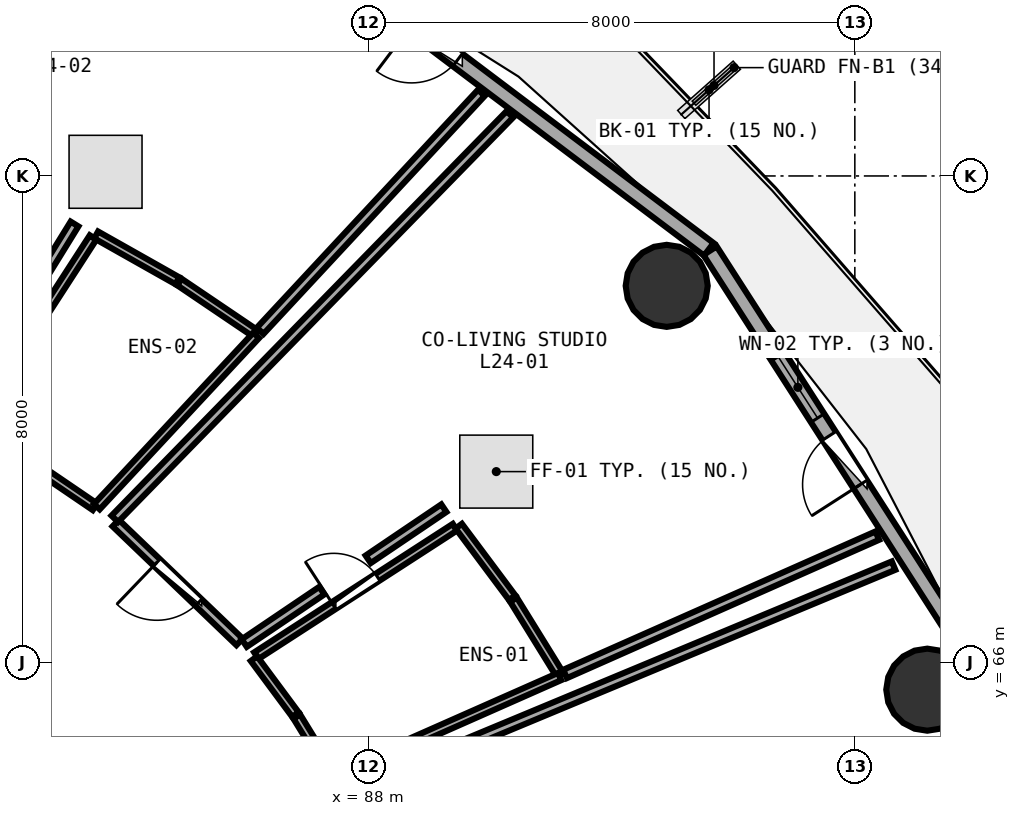
"""IFC4 building model, lengths in metres.
Left out: names, types, materials, properties, quantities, classifications, styles, units other than length and angle.
Written with IfcOpenShell. Run it as: python <this file> out.ifc"""

import sys

from ifc_helpers import new_model, si_unit, direction, frame, frame_2d, origin, origin_2d, place, context, subcontext, project, spatial, rectangle, circle, extrude, element, fill, save


model = new_model("IFC4")
c1 = context("Model", 3, precision=1e-05, world=origin(), true_north=direction((0.0, 1.0)))
c2 = subcontext(c1, "Body", "Model", "MODEL_VIEW")
j1 = project(units=[si_unit("LENGTHUNIT", "METRE"), si_unit("PLANEANGLEUNIT", "RADIAN")], contexts=[c1])
p1 = place(None, origin())
s1 = spatial("IfcSite", under=j1, at=p1, CompositionType="ELEMENT")
p2 = place(p1, origin())
s2 = spatial("IfcBuilding", under=s1, at=p2, CompositionType="ELEMENT")
p3 = place(p2, frame((0.0, 0.0, 95.1)))
s3 = spatial("IfcBuildingStorey", under=s2, at=p3, CompositionType="ELEMENT", Elevation=95.1)
for number, where, z_axis, x_axis in (
    (1, (97.192, 65.552, 0.0), (0.0, 0.0, 1.0), (1.0, 0.0, 0.0)),
    (2, (92.906, 72.193, 0.0), (0.0, 0.0, 1.0), (1.0, 0.0, 0.0)),
):
    element("IfcColumn", number, at=place(p3, frame(where, z_axis=z_axis, x_axis=x_axis)), inside=s3, PredefinedType="COLUMN", context=c2, shape_type="SweptSolid", body=[
        extrude(circle(Radius=0.675, at=origin_2d()), origin(), (0.0, 0.0, 1.0), 3.75),
    ])
p4 = place(p3, frame((98.048, 65.879, 0.0), z_axis=(0.0, 0.0, 1.0), x_axis=(-0.540620528459, 0.841266571432, 0.0)))
e3 = element("IfcWall", 3, at=p4, inside=s3, PredefinedType="SOLIDWALL", context=c2, shape_type="SweptSolid", body=[
    extrude(rectangle(XDim=8.193, YDim=0.26, at=frame_2d((4.096, 0.0))), origin(), (0.0, 0.0, 1.0), 3.475),
])
p5 = place(p4, frame((3.621, 0.0, 0.0)))
e4 = element("IfcOpeningElement", 4, at=p5, cuts=e3, PredefinedType="OPENING", context=c2, shape_type="SweptSolid", body=[
    extrude(rectangle(XDim=0.95, YDim=2.1, at=frame_2d((0.475, 1.05))), frame((0.0, 0.14, 0.0), z_axis=(0.0, -1.0, 0.0), x_axis=(1.0, 0.0, 0.0)), (0.0, 0.0, 1.0), 0.28),
])
p6 = place(p4, frame((4.921, 0.0, 0.85)))
e5 = element("IfcOpeningElement", 5, at=p6, cuts=e3, PredefinedType="OPENING", context=c2, shape_type="SweptSolid", body=[
    extrude(rectangle(XDim=1.2, YDim=1.45, at=frame_2d((0.6, 0.725))), frame((0.0, 0.14, 0.0), z_axis=(0.0, -1.0, 0.0), x_axis=(1.0, 0.0, 0.0)), (0.0, 0.0, 1.0), 0.28),
])
p7 = place(p3, frame((93.599, 72.793, 0.0), z_axis=(0.0, 0.0, 1.0), x_axis=(-0.798501507879, 0.601992808857, 0.0)))
e6 = element("IfcWall", 6, at=p7, inside=s3, PredefinedType="SOLIDWALL", context=c2, shape_type="SweptSolid", body=[
    extrude(rectangle(XDim=8.499, YDim=0.26, at=frame_2d((4.25, 0.0))), origin(), (0.0, 0.0, 1.0), 3.475),
])
p8 = place(p7, frame((5.175, 0.0, 0.0)))
e7 = element("IfcOpeningElement", 7, at=p8, cuts=e6, PredefinedType="OPENING", context=c2, shape_type="SweptSolid", body=[
    extrude(rectangle(XDim=0.95, YDim=2.1, at=frame_2d((0.475, 1.05))), frame((0.0, 0.14, 0.0), z_axis=(0.0, -1.0, 0.0), x_axis=(1.0, 0.0, 0.0)), (0.0, 0.0, 1.0), 0.28),
])
p9 = place(p7, frame((6.475, 0.0, 0.85)))
e8 = element("IfcOpeningElement", 8, at=p9, cuts=e6, PredefinedType="OPENING", context=c2, shape_type="SweptSolid", body=[
    extrude(rectangle(XDim=1.2, YDim=1.45, at=frame_2d((0.6, 0.725))), frame((0.0, 0.14, 0.0), z_axis=(0.0, -1.0, 0.0), x_axis=(1.0, 0.0, 0.0)), (0.0, 0.0, 1.0), 0.28),
])
p10 = place(p3, frame((86.156, 66.111, 0.0), z_axis=(0.0, 0.0, 1.0), x_axis=(0.839597088747, 0.543209654339, 0.0)))
e9 = element("IfcWall", 9, at=p10, inside=s3, PredefinedType="PLUMBINGWALL", context=c2, shape_type="SweptSolid", body=[
    extrude(rectangle(XDim=3.891, YDim=0.13, at=frame_2d((1.946, 0.0))), origin(), (0.0, 0.0, 1.0), 3.175),
])
p11 = place(p10, frame((1.516, 0.0, 0.0)))
e10 = element("IfcOpeningElement", 10, at=p11, cuts=e9, PredefinedType="OPENING", context=c2, shape_type="SweptSolid", body=[
    extrude(rectangle(XDim=0.86, YDim=2.05, at=frame_2d((0.43, 1.025))), frame((0.0, 0.075, 0.0), z_axis=(0.0, -1.0, 0.0), x_axis=(1.0, 0.0, 0.0)), (0.0, 0.0, 1.0), 0.15),
])
p12 = place(p3, frame((85.882, 66.337, 0.0), z_axis=(0.0, 0.0, 1.0), x_axis=(-0.721698326825, 0.692207718144, 0.0)))
e11 = element("IfcWall", 11, at=p12, inside=s3, PredefinedType="PARTITIONING", context=c2, shape_type="SweptSolid", body=[
    extrude(rectangle(XDim=2.823, YDim=0.15, at=frame_2d((1.412, 0.0))), origin(), (0.0, 0.0, 1.0), 2.925),
])
p13 = place(p12, frame((0.936, 0.0, 0.0)))
e12 = element("IfcOpeningElement", 12, at=p13, cuts=e11, PredefinedType="OPENING", context=c2, shape_type="SweptSolid", body=[
    extrude(rectangle(XDim=0.95, YDim=2.08, at=frame_2d((0.475, 1.04))), frame((0.0, 0.085, 0.0), z_axis=(0.0, -1.0, 0.0), x_axis=(1.0, 0.0, 0.0)), (0.0, 0.0, 1.0), 0.17),
])
p14 = place(p3, frame((81.469, 69.896, 0.0), z_axis=(0.0, 0.0, 1.0), x_axis=(0.543429789712, 0.839454622748, 0.0)))
e13 = element("IfcWall", 13, at=p14, inside=s3, PredefinedType="PLUMBINGWALL", context=c2, shape_type="SweptSolid", body=[
    extrude(rectangle(XDim=3.686, YDim=0.13, at=frame_2d((1.843, 0.0))), origin(), (0.0, 0.0, 1.0), 3.175),
])
p15 = place(p14, frame((1.413, 0.0, 0.0)))
e14 = element("IfcOpeningElement", 14, at=p15, cuts=e13, PredefinedType="OPENING", context=c2, shape_type="SweptSolid", body=[
    extrude(rectangle(XDim=0.86, YDim=2.05, at=frame_2d((0.43, 1.025))), frame((0.0, 0.075, 0.0), z_axis=(0.0, -1.0, 0.0), x_axis=(1.0, 0.0, 0.0)), (0.0, 0.0, 1.0), 0.15),
])
p16 = place(p3, frame((87.417, 64.141, 0.0), z_axis=(0.0, 0.0, 1.0), x_axis=(-0.52310141153, 0.852270446077, 0.0)))
e15 = element("IfcWall", 15, at=p16, inside=s3, PredefinedType="PLUMBINGWALL", context=c2, shape_type="SweptSolid", body=[
    extrude(rectangle(XDim=1.135, YDim=0.13, at=frame_2d((0.568, 0.0))), origin(), (0.0, 0.0, 1.0), 2.925),
])
p17 = place(p3, frame((86.8, 65.142, 0.0), z_axis=(0.0, 0.0, 1.0), x_axis=(-0.595625136946, 0.803262532574, 0.0)))
e16 = element("IfcWall", 16, at=p17, inside=s3, PredefinedType="PLUMBINGWALL", context=c2, shape_type="SweptSolid", body=[
    extrude(rectangle(XDim=1.145, YDim=0.13, at=frame_2d((0.573, 0.0))), origin(), (0.0, 0.0, 1.0), 2.925),
])
p18 = place(p3, frame((89.486, 68.241, 0.0), z_axis=(0.0, 0.0, 1.0), x_axis=(0.598215175904, -0.801335512328, 0.0)))
e17 = element("IfcWall", 17, at=p18, inside=s3, PredefinedType="PLUMBINGWALL", context=c2, shape_type="SweptSolid", body=[
    extrude(rectangle(XDim=1.468, YDim=0.13, at=frame_2d((0.734, 0.0))), origin(), (0.0, 0.0, 1.0), 3.48),
])
p19 = place(p3, frame((90.386, 67.032, 0.0), z_axis=(0.0, 0.0, 1.0), x_axis=(0.525910281035, -0.850540049793, 0.0)))
e18 = element("IfcWall", 18, at=p19, inside=s3, PredefinedType="PLUMBINGWALL", context=c2, shape_type="SweptSolid", body=[
    extrude(rectangle(XDim=1.457, YDim=0.13, at=frame_2d((0.729, 0.0))), origin(), (0.0, 0.0, 1.0), 3.48),
])
p20 = place(p3, frame((91.145, 65.768, 0.0), z_axis=(0.0, 0.0, 1.0), x_axis=(-0.914586427441, -0.404390487946, 0.0)))
e19 = element("IfcWall", 19, at=p20, inside=s3, PredefinedType="PLUMBINGWALL", context=c2, shape_type="SweptSolid", body=[
    extrude(rectangle(XDim=4.045, YDim=0.13, at=frame_2d((2.022, 0.0))), origin(), (0.0, 0.0, 1.0), 2.925),
])
p21 = place(p3, frame((83.829, 68.362, 0.0), z_axis=(0.0, 0.0, 1.0), x_axis=(0.698749209364, 0.715366718833, 0.0)))
e20 = element("IfcWall", 20, at=p21, inside=s3, PredefinedType="PARTITIONING", context=c2, shape_type="SweptSolid", body=[
    extrude(rectangle(XDim=9.3, YDim=0.15, at=frame_2d((4.65, 0.0))), origin(), (0.0, 0.0, 1.0), 2.975),
])
p22 = place(p3, frame((96.369, 68.085, 0.0), z_axis=(0.0, 0.0, 1.0), x_axis=(-0.914319955381, -0.404992616219, 0.0)))
e21 = element("IfcWall", 21, at=p22, inside=s3, PredefinedType="PARTITIONING", context=c2, shape_type="SweptSolid", body=[
    extrude(rectangle(XDim=5.616, YDim=0.15, at=frame_2d((2.808, 0.0))), origin(), (0.0, 0.0, 1.0), 2.975),
])
p23 = place(p3, frame((89.241, 68.537, 0.0), z_axis=(0.0, 0.0, 1.0), x_axis=(-0.828582854192, -0.559866460631, 0.0)))
e22 = element("IfcWall", 22, at=p23, inside=s3, PredefinedType="PARTITIONING", context=c2, shape_type="SweptSolid", body=[
    extrude(rectangle(XDim=1.502, YDim=0.15, at=frame_2d((0.751, 0.0))), origin(), (0.0, 0.0, 1.0), 3.175),
])
p24 = place(p3, frame((87.234, 67.181, 0.0), z_axis=(0.0, 0.0, 1.0), x_axis=(-0.828521381114, -0.559957427879, 0.0)))
e23 = element("IfcWall", 23, at=p24, inside=s3, PredefinedType="PARTITIONING", context=c2, shape_type="SweptSolid", body=[
    extrude(rectangle(XDim=1.54, YDim=0.15, at=frame_2d((0.77, 0.0))), origin(), (0.0, 0.0, 1.0), 3.235),
])
p25 = place(p3, frame((83.503, 68.558, 0.0), z_axis=(0.0, 0.0, 1.0), x_axis=(-0.826715543633, 0.56262012932, 0.0)))
e24 = element("IfcWall", 24, at=p25, inside=s3, PredefinedType="PLUMBINGWALL", context=c2, shape_type="SweptSolid", body=[
    extrude(rectangle(XDim=1.184, YDim=0.13, at=frame_2d((0.592, 0.0))), origin(), (0.0, 0.0, 1.0), 2.925),
])
p26 = place(p3, frame((83.522, 73.03, 0.0), z_axis=(0.0, 0.0, 1.0), x_axis=(0.870915556508, -0.491432694713, 0.0)))
e25 = element("IfcWall", 25, at=p26, inside=s3, PredefinedType="PLUMBINGWALL", context=c2, shape_type="SweptSolid", body=[
    extrude(rectangle(XDim=1.533, YDim=0.13, at=frame_2d((0.767, 0.0))), origin(), (0.0, 0.0, 1.0), 2.925),
])
p27 = place(p3, frame((84.892, 72.256, 0.0), z_axis=(0.0, 0.0, 1.0), x_axis=(0.828476223524, -0.560024237917, 0.0)))
e26 = element("IfcWall", 26, at=p27, inside=s3, PredefinedType="PLUMBINGWALL", context=c2, shape_type="SweptSolid", body=[
    extrude(rectangle(XDim=1.521, YDim=0.13, at=frame_2d((0.76, 0.0))), origin(), (0.0, 0.0, 1.0), 3.175),
])
p28 = place(p3, frame((86.154, 71.378, 0.0), z_axis=(0.0, 0.0, 1.0), x_axis=(-0.681137169266, -0.732155828116, 0.0)))
e27 = element("IfcWall", 27, at=p28, inside=s3, PredefinedType="PLUMBINGWALL", context=c2, shape_type="SweptSolid", body=[
    extrude(rectangle(XDim=3.847, YDim=0.13, at=frame_2d((1.924, 0.0))), origin(), (0.0, 0.0, 1.0), 3.175),
])
p29 = place(p3, frame((89.858, 75.367, 0.0), z_axis=(0.0, 0.0, 1.0), x_axis=(-0.680841843483, -0.732430463704, 0.0)))
e28 = element("IfcWall", 28, at=p29, inside=s3, PredefinedType="PARTITIONING", context=c2, shape_type="SweptSolid", body=[
    extrude(rectangle(XDim=5.343, YDim=0.15, at=frame_2d((2.671, 0.0))), origin(), (0.0, 0.0, 1.0), 2.975),
])
p30 = place(p3, frame((83.167, 73.21, 0.0), z_axis=(0.0, 0.0, 1.0), x_axis=(-0.525107327047, -0.8510360128, 0.0)))
e29 = element("IfcWall", 29, at=p30, inside=s3, PredefinedType="PARTITIONING", context=c2, shape_type="SweptSolid", body=[
    extrude(rectangle(XDim=1.402, YDim=0.15, at=frame_2d((0.701, 0.0))), origin(), (0.0, 0.0, 1.0), 3.175),
])
p31 = place(p3, frame((87.625, 63.84, 0.0), z_axis=(0.0, 0.0, 1.0), x_axis=(0.92321744991, 0.384277946521, 0.0)))
e30 = element("IfcWall", 30, at=p31, inside=s3, PredefinedType="PARTITIONING", context=c2, shape_type="SweptSolid", body=[
    extrude(rectangle(XDim=9.762, YDim=0.15, at=frame_2d((4.881, 0.0))), origin(), (0.0, 0.0, 1.0), 2.925),
])
p32 = place(p5, frame((0.95, 0.0, 0.0), z_axis=(0.0, 0.0, 1.0), x_axis=(-1.0, 0.0, 0.0)))
e31 = element("IfcDoor", 31, at=p32, inside=s3, OperationType="SINGLE_SWING_RIGHT", PredefinedType="DOOR", context=c2, shape_type="SweptSolid", body=[
    extrude(rectangle(XDim=0.95, YDim=2.1, at=frame_2d((0.475, 1.05))), frame((0.0, 0.025, 0.0), z_axis=(0.0, -1.0, 0.0), x_axis=(1.0, 0.0, 0.0)), (0.0, 0.0, 1.0), 0.05),
])
fill(e4, e31)
p33 = place(p6, origin())
e32 = element("IfcWindow", 32, at=p33, inside=s3, PartitioningType="SINGLE_PANEL", PredefinedType="WINDOW", context=c2, shape_type="SweptSolid", body=[
    extrude(rectangle(XDim=1.2, YDim=1.45, at=frame_2d((0.6, 0.725))), frame((0.0, 0.03, 0.0), z_axis=(0.0, -1.0, 0.0), x_axis=(1.0, 0.0, 0.0)), (0.0, 0.0, 1.0), 0.06),
])
fill(e5, e32)
p34 = place(p8, frame((0.95, 0.0, 0.0), z_axis=(0.0, 0.0, 1.0), x_axis=(-1.0, 0.0, 0.0)))
e33 = element("IfcDoor", 33, at=p34, inside=s3, OperationType="SINGLE_SWING_LEFT", PredefinedType="DOOR", context=c2, shape_type="SweptSolid", body=[
    extrude(rectangle(XDim=0.95, YDim=2.1, at=frame_2d((0.475, 1.05))), frame((0.0, 0.025, 0.0), z_axis=(0.0, -1.0, 0.0), x_axis=(1.0, 0.0, 0.0)), (0.0, 0.0, 1.0), 0.05),
])
fill(e7, e33)
p35 = place(p11, origin())
e34 = element("IfcDoor", 34, at=p35, inside=s3, OperationType="SINGLE_SWING_LEFT", PredefinedType="DOOR", context=c2, shape_type="SweptSolid", body=[
    extrude(rectangle(XDim=0.86, YDim=2.05, at=frame_2d((0.43, 1.025))), frame((0.0, 0.025, 0.0), z_axis=(0.0, -1.0, 0.0), x_axis=(1.0, 0.0, 0.0)), (0.0, 0.0, 1.0), 0.05),
])
fill(e10, e34)
p36 = place(p13, origin())
e35 = element("IfcDoor", 35, at=p36, inside=s3, OperationType="SINGLE_SWING_RIGHT", PredefinedType="DOOR", context=c2, shape_type="SweptSolid", body=[
    extrude(rectangle(XDim=0.95, YDim=2.08, at=frame_2d((0.475, 1.04))), frame((0.0, 0.025, 0.0), z_axis=(0.0, -1.0, 0.0), x_axis=(1.0, 0.0, 0.0)), (0.0, 0.0, 1.0), 0.05),
])
fill(e12, e35)
save(model, sys.argv[1])
